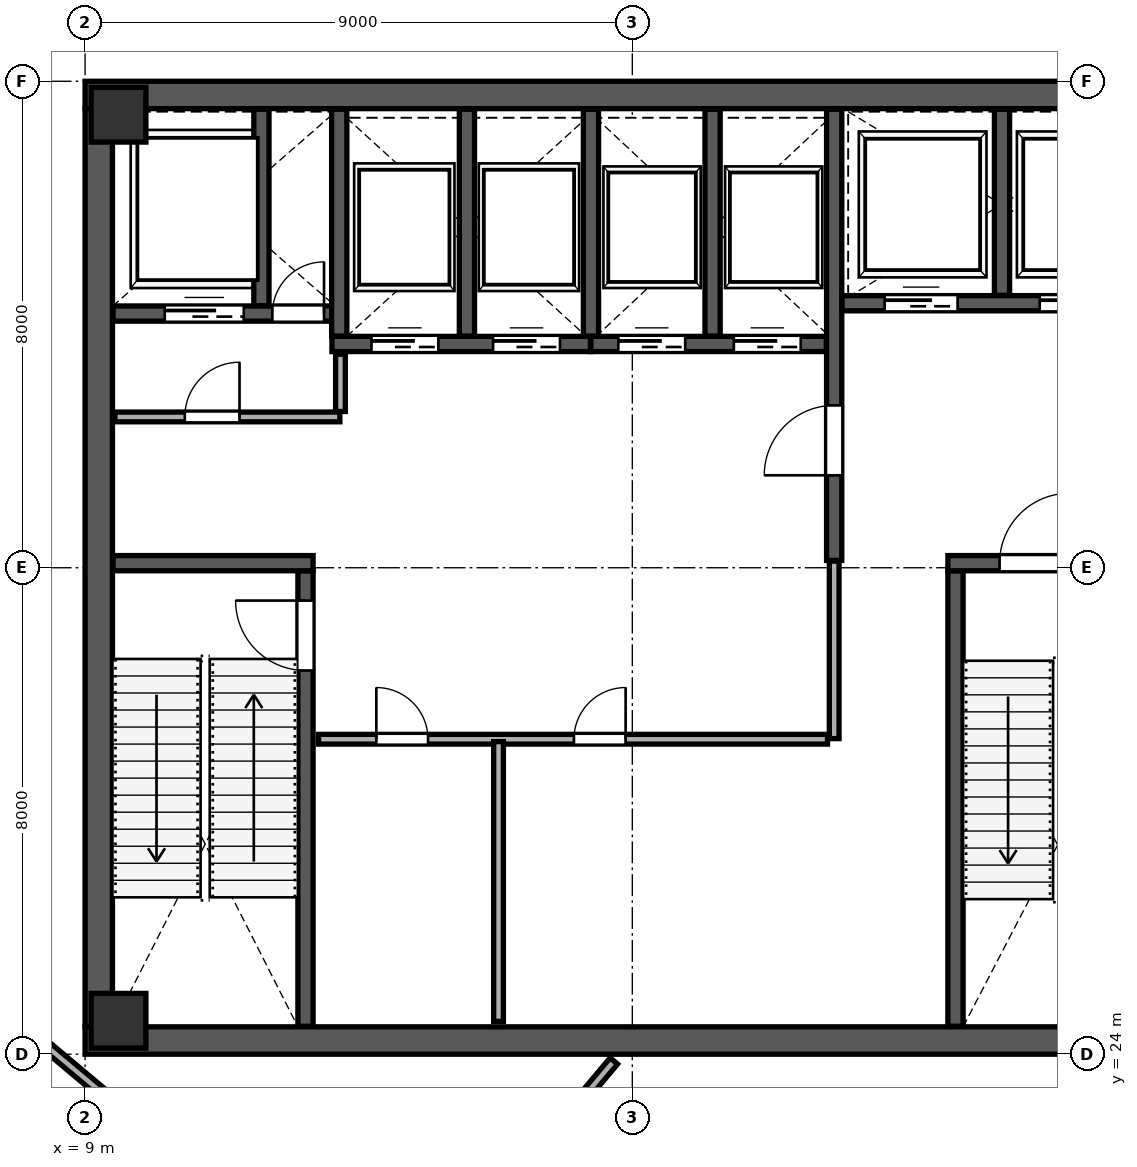
"""IFC4 building model, lengths in metres.
Left out: names, types, materials, properties, quantities, classifications, styles, units other than length and angle.
Written with IfcOpenShell. Run it as: python <this file> out.ifc"""

import sys

from ifc_helpers import new_model, si_unit, direction, frame, frame_2d, origin, origin_2d, place, context, subcontext, project, spatial, rectangle, extrude, source, transform, mapped, element, fill, save


model = new_model("IFC4")
c1 = context("Model", 3, precision=1e-05, world=origin(), true_north=direction((0.0, 1.0)))
c2 = subcontext(c1, "Body", "Model", "MODEL_VIEW")
j1 = project(units=[si_unit("LENGTHUNIT", "METRE"), si_unit("PLANEANGLEUNIT", "RADIAN")], contexts=[c1])
p1 = place(None, origin())
s1 = spatial("IfcSite", under=j1, at=p1, CompositionType="ELEMENT")
p2 = place(p1, origin())
s2 = spatial("IfcBuilding", under=s1, at=p2, CompositionType="ELEMENT")
p3 = place(p2, frame((0.0, 0.0, 215.2)))
s3 = spatial("IfcBuildingStorey", under=s2, at=p3, CompositionType="ELEMENT", Elevation=215.2)
m1 = source(origin(), c2, "Body", "SweptSolid", [
    extrude(rectangle(XDim=0.9, YDim=0.9, at=origin_2d()), origin(), (0.0, 0.0, 1.0), 5.399),
])
for number, where, z_axis, x_axis in (
    (1, (9.55, 24.55, 0.001), (0.0, 0.0, 1.0), (1.0, 0.0, 0.0)),
    (2, (9.55, 39.45, 0.001), (0.0, 0.0, 1.0), (1.0, 0.0, 0.0)),
):
    element("IfcColumn", number, at=place(p3, frame(where, z_axis=z_axis, x_axis=x_axis)), inside=s3, PredefinedType="COLUMN", context=c2, shape_type="MappedRepresentation", body=[
        mapped(m1, transform((0.0, 0.0, 0.0), scale=1.0)),
    ])
p4 = place(p3, frame((9.225, 24.45, 0.0), z_axis=(0.0, 0.0, 1.0), x_axis=(0.0, 1.0, 0.0)))
e3 = element("IfcWall", 3, at=p4, inside=s3, PredefinedType="SHEAR", context=c2, shape_type="SweptSolid", body=[
    extrude(rectangle(XDim=15.1, YDim=0.45, at=frame_2d((7.55, 0.0))), origin(), (0.0, 0.0, 1.0), 5.16),
])
for number, where, z_axis, x_axis in (
    (4, (9.0, 24.225, 0.0), (0.0, 0.0, 1.0), (1.0, 0.0, 0.0)),
    (5, (9.0, 39.775, 0.0), (0.0, 0.0, 1.0), (1.0, 0.0, 0.0)),
):
    element("IfcWall", number, at=place(p3, frame(where, z_axis=z_axis, x_axis=x_axis)), inside=s3, PredefinedType="SHEAR", context=c2, shape_type="SweptSolid", body=[
        extrude(rectangle(XDim=18.0, YDim=0.45, at=frame_2d((9.0, 0.0))), origin(), (0.0, 0.0, 1.0), 5.16),
    ])
p5 = place(p3, frame((12.625, 24.46, 0.0), z_axis=(0.0, 0.0, 1.0), x_axis=(0.0, 1.0, 0.0)))
e6 = element("IfcWall", 6, at=p5, inside=s3, PredefinedType="SHEAR", context=c2, shape_type="SweptSolid", body=[
    extrude(rectangle(XDim=7.49, YDim=0.25, at=frame_2d((3.745, 0.0))), origin(), (0.0, 0.0, 1.0), 5.16),
])
p6 = place(p5, frame((5.85, 0.0, 0.0)))
e7 = element("IfcOpeningElement", 7, at=p6, cuts=e6, PredefinedType="OPENING", context=c2, shape_type="SweptSolid", body=[
    extrude(rectangle(XDim=1.15, YDim=2.2, at=frame_2d((0.575, 1.1))), frame((0.0, 0.135, 0.0), z_axis=(0.0, -1.0, 0.0), x_axis=(1.0, 0.0, 0.0)), (0.0, 0.0, 1.0), 0.27),
])
p7 = place(p3, frame((9.46, 32.075, 0.0), z_axis=(0.0, 0.0, 1.0), x_axis=(1.0, 0.0, 0.0)))
e8 = element("IfcWall", 8, at=p7, inside=s3, PredefinedType="SHEAR", context=c2, shape_type="SweptSolid", body=[
    extrude(rectangle(XDim=3.29, YDim=0.25, at=frame_2d((1.645, 0.0))), origin(), (0.0, 0.0, 1.0), 5.16),
])
p8 = place(p3, frame((23.315, 24.46, 0.0), z_axis=(0.0, 0.0, 1.0), x_axis=(0.0, 1.0, 0.0)))
e9 = element("IfcWall", 9, at=p8, inside=s3, PredefinedType="SHEAR", context=c2, shape_type="SweptSolid", body=[
    extrude(rectangle(XDim=7.49, YDim=0.25, at=frame_2d((3.745, 0.0))), origin(), (0.0, 0.0, 1.0), 5.16),
])
p9 = place(p3, frame((23.19, 32.075, 0.0), z_axis=(0.0, 0.0, 1.0), x_axis=(1.0, 0.0, 0.0)))
e10 = element("IfcWall", 10, at=p9, inside=s3, PredefinedType="SHEAR", context=c2, shape_type="SweptSolid", body=[
    extrude(rectangle(XDim=3.35, YDim=0.25, at=frame_2d((1.675, 0.0))), origin(), (0.0, 0.0, 1.0), 5.16),
])
p10 = place(p9, frame((0.85, 0.0, 0.0)))
e11 = element("IfcOpeningElement", 11, at=p10, cuts=e10, PredefinedType="OPENING", context=c2, shape_type="SweptSolid", body=[
    extrude(rectangle(XDim=1.15, YDim=2.2, at=frame_2d((0.575, 1.1))), frame((0.0, 0.135, 0.0), z_axis=(0.0, -1.0, 0.0), x_axis=(1.0, 0.0, 0.0)), (0.0, 0.0, 1.0), 0.27),
])
p11 = place(p3, frame((21.32, 32.12, 0.0), z_axis=(0.0, 0.0, 1.0), x_axis=(0.0, 1.0, 0.0)))
e12 = element("IfcWall", 12, at=p11, inside=s3, PredefinedType="SHEAR", context=c2, shape_type="SweptSolid", body=[
    extrude(rectangle(XDim=7.42, YDim=0.25, at=frame_2d((3.71, 0.0))), origin(), (0.0, 0.0, 1.0), 5.16),
])
p12 = place(p11, frame((1.4, 0.0, 0.0)))
e13 = element("IfcOpeningElement", 13, at=p12, cuts=e12, PredefinedType="OPENING", context=c2, shape_type="SweptSolid", body=[
    extrude(rectangle(XDim=1.15, YDim=2.2, at=frame_2d((0.575, 1.1))), frame((0.0, 0.135, 0.0), z_axis=(0.0, -1.0, 0.0), x_axis=(1.0, 0.0, 0.0)), (0.0, 0.0, 1.0), 0.27),
])
p13 = place(p3, frame((9.46, 36.18, 0.0), z_axis=(0.0, 0.0, 1.0), x_axis=(1.0, 0.0, 0.0)))
e14 = element("IfcWall", 14, at=p13, inside=s3, PredefinedType="SHEAR", context=c2, shape_type="SweptSolid", body=[
    extrude(rectangle(XDim=3.79, YDim=0.25, at=frame_2d((1.895, 0.0))), origin(), (0.0, 0.0, 1.0), 5.16),
])
p14 = place(p13, frame((2.62, 0.0, 0.0)))
e15 = element("IfcOpeningElement", 15, at=p14, cuts=e14, PredefinedType="OPENING", context=c2, shape_type="SweptSolid", body=[
    extrude(rectangle(XDim=0.85, YDim=2.1, at=frame_2d((0.425, 1.05))), frame((0.0, 0.135, 0.0), z_axis=(0.0, -1.0, 0.0), x_axis=(1.0, 0.0, 0.0)), (0.0, 0.0, 1.0), 0.27),
])
p15 = place(p13, frame((0.85, 0.0, 0.0)))
e16 = element("IfcOpeningElement", 16, at=p15, cuts=e14, PredefinedType="OPENING", context=c2, shape_type="SweptSolid", body=[
    extrude(rectangle(XDim=1.3, YDim=2.25, at=frame_2d((0.65, 1.125))), frame((0.0, 0.135, 0.0), z_axis=(0.0, -1.0, 0.0), x_axis=(1.0, 0.0, 0.0)), (0.0, 0.0, 1.0), 0.27),
])
p16 = place(p3, frame((11.9, 36.31, 0.0), z_axis=(0.0, 0.0, 1.0), x_axis=(0.0, 1.0, 0.0)))
e17 = element("IfcWall", 17, at=p16, inside=s3, PredefinedType="SHEAR", context=c2, shape_type="SweptSolid", body=[
    extrude(rectangle(XDim=3.23, YDim=0.25, at=frame_2d((1.615, 0.0))), origin(), (0.0, 0.0, 1.0), 5.16),
])
p17 = place(p3, frame((21.45, 36.35, 0.0), z_axis=(0.0, 0.0, 1.0), x_axis=(1.0, 0.0, 0.0)))
e18 = element("IfcWall", 18, at=p17, inside=s3, PredefinedType="SHEAR", context=c2, shape_type="SweptSolid", body=[
    extrude(rectangle(XDim=5.09, YDim=0.25, at=frame_2d((2.545, 0.0))), origin(), (0.0, 0.0, 1.0), 5.16),
])
p18 = place(p17, frame((0.7, 0.0, 0.0)))
e19 = element("IfcOpeningElement", 19, at=p18, cuts=e18, PredefinedType="OPENING", context=c2, shape_type="SweptSolid", body=[
    extrude(rectangle(XDim=1.2, YDim=2.2, at=frame_2d((0.6, 1.1))), frame((0.0, 0.135, 0.0), z_axis=(0.0, -1.0, 0.0), x_axis=(1.0, 0.0, 0.0)), (0.0, 0.0, 1.0), 0.27),
])
p19 = place(p17, frame((3.25, 0.0, 0.0)))
e20 = element("IfcOpeningElement", 20, at=p19, cuts=e18, PredefinedType="OPENING", context=c2, shape_type="SweptSolid", body=[
    extrude(rectangle(XDim=1.2, YDim=2.2, at=frame_2d((0.6, 1.1))), frame((0.0, 0.135, 0.0), z_axis=(0.0, -1.0, 0.0), x_axis=(1.0, 0.0, 0.0)), (0.0, 0.0, 1.0), 0.27),
])
p20 = place(p3, frame((24.08, 36.48, 0.0), z_axis=(0.0, 0.0, 1.0), x_axis=(0.0, 1.0, 0.0)))
e21 = element("IfcWall", 21, at=p20, inside=s3, PredefinedType="SHEAR", context=c2, shape_type="SweptSolid", body=[
    extrude(rectangle(XDim=3.06, YDim=0.25, at=frame_2d((1.53, 0.0))), origin(), (0.0, 0.0, 1.0), 5.16),
])
p21 = place(p3, frame((13.06, 35.68, 0.0), z_axis=(0.0, 0.0, 1.0), x_axis=(1.0, 0.0, 0.0)))
e22 = element("IfcWall", 22, at=p21, inside=s3, PredefinedType="SHEAR", context=c2, shape_type="SweptSolid", body=[
    extrude(rectangle(XDim=4.25, YDim=0.25, at=frame_2d((2.125, 0.0))), origin(), (0.0, 0.0, 1.0), 5.16),
])
p22 = place(p21, frame((0.65, 0.0, 0.0)))
e23 = element("IfcOpeningElement", 23, at=p22, cuts=e22, PredefinedType="OPENING", context=c2, shape_type="SweptSolid", body=[
    extrude(rectangle(XDim=1.1, YDim=2.2, at=frame_2d((0.55, 1.1))), frame((0.0, 0.135, 0.0), z_axis=(0.0, -1.0, 0.0), x_axis=(1.0, 0.0, 0.0)), (0.0, 0.0, 1.0), 0.27),
])
p23 = place(p21, frame((2.65, 0.0, 0.0)))
e24 = element("IfcOpeningElement", 24, at=p23, cuts=e22, PredefinedType="OPENING", context=c2, shape_type="SweptSolid", body=[
    extrude(rectangle(XDim=1.1, YDim=2.2, at=frame_2d((0.55, 1.1))), frame((0.0, 0.135, 0.0), z_axis=(0.0, -1.0, 0.0), x_axis=(1.0, 0.0, 0.0)), (0.0, 0.0, 1.0), 0.27),
])
for number, where, z_axis, x_axis in (
    (25, (13.18, 35.81, 0.0), (0.0, 0.0, 1.0), (0.0, 1.0, 0.0)),
    (26, (15.28, 35.81, 0.0), (0.0, 0.0, 1.0), (0.0, 1.0, 0.0)),
):
    element("IfcWall", number, at=place(p3, frame(where, z_axis=z_axis, x_axis=x_axis)), inside=s3, PredefinedType="SHEAR", context=c2, shape_type="SweptSolid", body=[
        extrude(rectangle(XDim=3.73, YDim=0.25, at=frame_2d((1.865, 0.0))), origin(), (0.0, 0.0, 1.0), 5.16),
    ])
p24 = place(p3, frame((17.32, 35.68, 0.0), z_axis=(0.0, 0.0, 1.0), x_axis=(1.0, 0.0, 0.0)))
e27 = element("IfcWall", 27, at=p24, inside=s3, PredefinedType="SHEAR", context=c2, shape_type="SweptSolid", body=[
    extrude(rectangle(XDim=3.87, YDim=0.25, at=frame_2d((1.935, 0.0))), origin(), (0.0, 0.0, 1.0), 5.16),
])
p25 = place(p24, frame((0.45, 0.0, 0.0)))
e28 = element("IfcOpeningElement", 28, at=p25, cuts=e27, PredefinedType="OPENING", context=c2, shape_type="SweptSolid", body=[
    extrude(rectangle(XDim=1.1, YDim=2.2, at=frame_2d((0.55, 1.1))), frame((0.0, 0.135, 0.0), z_axis=(0.0, -1.0, 0.0), x_axis=(1.0, 0.0, 0.0)), (0.0, 0.0, 1.0), 0.27),
])
p26 = place(p24, frame((2.35, 0.0, 0.0)))
e29 = element("IfcOpeningElement", 29, at=p26, cuts=e27, PredefinedType="OPENING", context=c2, shape_type="SweptSolid", body=[
    extrude(rectangle(XDim=1.1, YDim=2.2, at=frame_2d((0.55, 1.1))), frame((0.0, 0.135, 0.0), z_axis=(0.0, -1.0, 0.0), x_axis=(1.0, 0.0, 0.0)), (0.0, 0.0, 1.0), 0.27),
])
for number, where, z_axis, x_axis in (
    (30, (17.32, 35.81, 0.0), (0.0, 0.0, 1.0), (0.0, 1.0, 0.0)),
    (31, (19.32, 35.81, 0.0), (0.0, 0.0, 1.0), (0.0, 1.0, 0.0)),
):
    element("IfcWall", number, at=place(p3, frame(where, z_axis=z_axis, x_axis=x_axis)), inside=s3, PredefinedType="SHEAR", context=c2, shape_type="SweptSolid", body=[
        extrude(rectangle(XDim=3.73, YDim=0.25, at=frame_2d((1.865, 0.0))), origin(), (0.0, 0.0, 1.0), 5.16),
    ])
p27 = place(p3, frame((9.49, 34.48, 0.0), z_axis=(0.0, 0.0, 1.0), x_axis=(1.0, 0.0, 0.0)))
e32 = element("IfcWall", 32, at=p27, inside=s3, PredefinedType="PARTITIONING", context=c2, shape_type="SweptSolid", body=[
    extrude(rectangle(XDim=3.7, YDim=0.16, at=frame_2d((1.85, 0.0))), origin(), (0.0, 0.0, 1.0), 5.16),
])
p28 = place(p27, frame((1.15, 0.0, 0.0)))
e33 = element("IfcOpeningElement", 33, at=p28, cuts=e32, PredefinedType="OPENING", context=c2, shape_type="SweptSolid", body=[
    extrude(rectangle(XDim=0.9, YDim=2.15, at=frame_2d((0.45, 1.075))), frame((0.0, 0.09, 0.0), z_axis=(0.0, -1.0, 0.0), x_axis=(1.0, 0.0, 0.0)), (0.0, 0.0, 1.0), 0.18),
])
p29 = place(p3, frame((13.2, 34.57, 0.0), z_axis=(0.0, 0.0, 1.0), x_axis=(0.0, 1.0, 0.0)))
e34 = element("IfcWall", 34, at=p29, inside=s3, PredefinedType="PARTITIONING", context=c2, shape_type="SweptSolid", body=[
    extrude(rectangle(XDim=0.94, YDim=0.16, at=frame_2d((0.47, 0.0))), origin(), (0.0, 0.0, 1.0), 5.16),
])
p30 = place(p3, frame((12.84, 29.18, 0.0), z_axis=(0.0, 0.0, 1.0), x_axis=(1.0, 0.0, 0.0)))
e35 = element("IfcWall", 35, at=p30, inside=s3, PredefinedType="PARTITIONING", context=c2, shape_type="SweptSolid", body=[
    extrude(rectangle(XDim=8.37, YDim=0.16, at=frame_2d((4.185, 0.0))), origin(), (0.0, 0.0, 1.0), 5.16),
])
p31 = place(p30, frame((0.95, 0.0, 0.0)))
e36 = element("IfcOpeningElement", 36, at=p31, cuts=e35, PredefinedType="OPENING", context=c2, shape_type="SweptSolid", body=[
    extrude(rectangle(XDim=0.85, YDim=2.1, at=frame_2d((0.425, 1.05))), frame((0.0, 0.09, 0.0), z_axis=(0.0, -1.0, 0.0), x_axis=(1.0, 0.0, 0.0)), (0.0, 0.0, 1.0), 0.18),
])
p32 = place(p30, frame((4.2, 0.0, 0.0)))
e37 = element("IfcOpeningElement", 37, at=p32, cuts=e35, PredefinedType="OPENING", context=c2, shape_type="SweptSolid", body=[
    extrude(rectangle(XDim=0.85, YDim=2.1, at=frame_2d((0.425, 1.05))), frame((0.0, 0.09, 0.0), z_axis=(0.0, -1.0, 0.0), x_axis=(1.0, 0.0, 0.0)), (0.0, 0.0, 1.0), 0.18),
])
p33 = place(p3, frame((15.8, 24.54, 0.0), z_axis=(0.0, 0.0, 1.0), x_axis=(0.0, 1.0, 0.0)))
e38 = element("IfcWall", 38, at=p33, inside=s3, PredefinedType="PARTITIONING", context=c2, shape_type="SweptSolid", body=[
    extrude(rectangle(XDim=4.6, YDim=0.16, at=frame_2d((2.3, 0.0))), origin(), (0.0, 0.0, 1.0), 5.16),
])
p34 = place(p3, frame((21.32, 29.19, 0.0), z_axis=(0.0, 0.0, 1.0), x_axis=(0.0, 1.0, 0.0)))
e39 = element("IfcWall", 39, at=p34, inside=s3, PredefinedType="PARTITIONING", context=c2, shape_type="SweptSolid", body=[
    extrude(rectangle(XDim=2.92, YDim=0.16, at=frame_2d((1.46, 0.0))), origin(), (0.0, 0.0, 1.0), 5.16),
])
p35 = place(p3, frame((5.067, 26.9, 0.0), z_axis=(0.0, 0.0, 1.0), x_axis=(0.766051435801, -0.64277927604, 0.0)))
e40 = element("IfcWall", 40, at=p35, inside=s3, PredefinedType="PARTITIONING", context=c2, shape_type="SweptSolid", body=[
    extrude(rectangle(XDim=11.57, YDim=0.16, at=frame_2d((5.785, 0.0))), origin(), (0.0, 0.0, 1.0), 5.16),
])
p36 = place(p35, frame((1.15, 0.0, 0.0)))
e41 = element("IfcOpeningElement", 41, at=p36, cuts=e40, PredefinedType="OPENING", context=c2, shape_type="SweptSolid", body=[
    extrude(rectangle(XDim=0.95, YDim=2.15, at=frame_2d((0.475, 1.075))), frame((0.0, 0.09, 0.0), z_axis=(0.0, -1.0, 0.0), x_axis=(1.0, 0.0, 0.0)), (0.0, 0.0, 1.0), 0.18),
])
p37 = place(p3, frame((13.987, 19.468, 0.0), z_axis=(0.0, 0.0, 1.0), x_axis=(0.642768435417, 0.766060531833, 0.0)))
e42 = element("IfcWall", 42, at=p37, inside=s3, PredefinedType="PARTITIONING", context=c2, shape_type="SweptSolid", body=[
    extrude(rectangle(XDim=5.772, YDim=0.16, at=frame_2d((2.886, 0.0))), origin(), (0.0, 0.0, 1.0), 5.16),
])
p38 = place(p3, frame((16.416, 50.848, 0.0), z_axis=(0.0, 0.0, 1.0), x_axis=(0.766042472976, -0.642789957604, 0.0)))
e43 = element("IfcWall", 43, at=p38, inside=s3, PredefinedType="PARTITIONING", context=c2, shape_type="SweptSolid", body=[
    extrude(rectangle(XDim=27.03, YDim=0.115, at=frame_2d((13.515, 0.0))), origin(), (0.0, 0.0, 1.0), 5.16),
])
p39 = place(p38, frame((18.8, 0.0, 0.0)))
e44 = element("IfcOpeningElement", 44, at=p39, cuts=e43, PredefinedType="OPENING", context=c2, shape_type="SweptSolid", body=[
    extrude(rectangle(XDim=0.95, YDim=2.15, at=frame_2d((0.475, 1.075))), frame((0.0, 0.067, 0.0), z_axis=(0.0, -1.0, 0.0), x_axis=(1.0, 0.0, 0.0)), (0.0, 0.0, 1.0), 0.135),
])
p40 = place(p3, frame((0.894, 32.412, 0.0), z_axis=(0.0, 0.0, 1.0), x_axis=(0.64277673271, 0.766053569854, 0.0)))
e45 = element("IfcWall", 45, at=p40, inside=s3, PredefinedType="PARTITIONING", context=c2, shape_type="SweptSolid", body=[
    extrude(rectangle(XDim=24.06, YDim=0.135, at=frame_2d((12.03, 0.0))), origin(), (0.0, 0.0, 1.0), 5.16),
])
p41 = place(p40, frame((2.2, 0.0, 0.0)))
e46 = element("IfcOpeningElement", 46, at=p41, cuts=e45, PredefinedType="OPENING", context=c2, shape_type="SweptSolid", body=[
    extrude(rectangle(XDim=0.95, YDim=2.15, at=frame_2d((0.475, 1.075))), frame((0.0, 0.078, 0.0), z_axis=(0.0, -1.0, 0.0), x_axis=(1.0, 0.0, 0.0)), (0.0, 0.0, 1.0), 0.155),
])
m2 = source(origin(), c2, "Body", "SweptSolid", [
    extrude(rectangle(XDim=1.15, YDim=2.2, at=frame_2d((0.575, 1.1))), frame((0.0, 0.025, 0.0), z_axis=(0.0, -1.0, 0.0), x_axis=(1.0, 0.0, 0.0)), (0.0, 0.0, 1.0), 0.05),
])
p42 = place(p6, origin())
e47 = element("IfcDoor", 47, at=p42, inside=s3, OperationType="SINGLE_SWING_RIGHT", PredefinedType="DOOR", context=c2, shape_type="MappedRepresentation", body=[
    mapped(m2, transform((0.0, 0.0, 0.0), scale=1.0)),
])
fill(e7, e47)
m3 = source(origin(), c2, "Body", "SweptSolid", [
    extrude(rectangle(XDim=1.15, YDim=2.2, at=frame_2d((0.575, 1.1))), frame((0.0, 0.025, 0.0), z_axis=(0.0, -1.0, 0.0), x_axis=(1.0, 0.0, 0.0)), (0.0, 0.0, 1.0), 0.05),
])
p43 = place(p12, origin())
e48 = element("IfcDoor", 48, at=p43, inside=s3, OperationType="SINGLE_SWING_LEFT", PredefinedType="DOOR", context=c2, shape_type="MappedRepresentation", body=[
    mapped(m3, transform((0.0, 0.0, 0.0), scale=1.0)),
])
fill(e13, e48)
p44 = place(p10, origin())
e49 = element("IfcDoor", 49, at=p44, inside=s3, OperationType="SINGLE_SWING_RIGHT", PredefinedType="DOOR", context=c2, shape_type="MappedRepresentation", body=[
    mapped(m2, transform((0.0, 0.0, 0.0), scale=1.0)),
])
fill(e11, e49)
m4 = source(origin(), c2, "Body", "SweptSolid", [
    extrude(rectangle(XDim=0.85, YDim=2.1, at=frame_2d((0.425, 1.05))), frame((0.0, 0.025, 0.0), z_axis=(0.0, -1.0, 0.0), x_axis=(1.0, 0.0, 0.0)), (0.0, 0.0, 1.0), 0.05),
])
p45 = place(p14, origin())
e50 = element("IfcDoor", 50, at=p45, inside=s3, OperationType="SINGLE_SWING_RIGHT", PredefinedType="DOOR", context=c2, shape_type="MappedRepresentation", body=[
    mapped(m4, transform((0.0, 0.0, 0.0), scale=1.0)),
])
fill(e15, e50)
m5 = source(origin(), c2, "Body", "SweptSolid", [
    extrude(rectangle(XDim=1.1, YDim=2.2, at=frame_2d((0.55, 1.1))), frame((0.0, 0.025, 0.0), z_axis=(0.0, -1.0, 0.0), x_axis=(1.0, 0.0, 0.0)), (0.0, 0.0, 1.0), 0.05),
])
p46 = place(p22, origin())
e51 = element("IfcDoor", 51, at=p46, inside=s3, OperationType="SLIDING_TO_LEFT", PredefinedType="DOOR", context=c2, shape_type="MappedRepresentation", body=[
    mapped(m5, transform((0.0, 0.0, 0.0), scale=1.0)),
])
fill(e23, e51)
p47 = place(p23, origin())
e52 = element("IfcDoor", 52, at=p47, inside=s3, OperationType="SLIDING_TO_RIGHT", PredefinedType="DOOR", context=c2, shape_type="MappedRepresentation", body=[
    mapped(m5, transform((0.0, 0.0, 0.0), scale=1.0)),
])
fill(e24, e52)
p48 = place(p25, origin())
e53 = element("IfcDoor", 53, at=p48, inside=s3, OperationType="SLIDING_TO_LEFT", PredefinedType="DOOR", context=c2, shape_type="MappedRepresentation", body=[
    mapped(m5, transform((0.0, 0.0, 0.0), scale=1.0)),
])
fill(e28, e53)
p49 = place(p26, origin())
e54 = element("IfcDoor", 54, at=p49, inside=s3, OperationType="SLIDING_TO_RIGHT", PredefinedType="DOOR", context=c2, shape_type="MappedRepresentation", body=[
    mapped(m5, transform((0.0, 0.0, 0.0), scale=1.0)),
])
fill(e29, e54)
m6 = source(origin(), c2, "Body", "SweptSolid", [
    extrude(rectangle(XDim=1.2, YDim=2.2, at=frame_2d((0.6, 1.1))), frame((0.0, 0.025, 0.0), z_axis=(0.0, -1.0, 0.0), x_axis=(1.0, 0.0, 0.0)), (0.0, 0.0, 1.0), 0.05),
])
p50 = place(p18, origin())
e55 = element("IfcDoor", 55, at=p50, inside=s3, OperationType="SLIDING_TO_LEFT", PredefinedType="DOOR", context=c2, shape_type="MappedRepresentation", body=[
    mapped(m6, transform((0.0, 0.0, 0.0), scale=1.0)),
])
fill(e19, e55)
p51 = place(p19, origin())
e56 = element("IfcDoor", 56, at=p51, inside=s3, OperationType="SLIDING_TO_RIGHT", PredefinedType="DOOR", context=c2, shape_type="MappedRepresentation", body=[
    mapped(m6, transform((0.0, 0.0, 0.0), scale=1.0)),
])
fill(e20, e56)
m7 = source(origin(), c2, "Body", "SweptSolid", [
    extrude(rectangle(XDim=1.3, YDim=2.25, at=frame_2d((0.65, 1.125))), frame((0.0, 0.025, 0.0), z_axis=(0.0, -1.0, 0.0), x_axis=(1.0, 0.0, 0.0)), (0.0, 0.0, 1.0), 0.05),
])
p52 = place(p15, origin())
e57 = element("IfcDoor", 57, at=p52, inside=s3, OperationType="SLIDING_TO_LEFT", PredefinedType="DOOR", context=c2, shape_type="MappedRepresentation", body=[
    mapped(m7, transform((0.0, 0.0, 0.0), scale=1.0)),
])
fill(e16, e57)
m8 = source(origin(), c2, "Body", "SweptSolid", [
    extrude(rectangle(XDim=0.9, YDim=2.15, at=frame_2d((0.45, 1.075))), frame((0.0, 0.025, 0.0), z_axis=(0.0, -1.0, 0.0), x_axis=(1.0, 0.0, 0.0)), (0.0, 0.0, 1.0), 0.05),
])
p53 = place(p28, origin())
e58 = element("IfcDoor", 58, at=p53, inside=s3, OperationType="SINGLE_SWING_RIGHT", PredefinedType="DOOR", context=c2, shape_type="MappedRepresentation", body=[
    mapped(m8, transform((0.0, 0.0, 0.0), scale=1.0)),
])
fill(e33, e58)
p54 = place(p31, origin())
e59 = element("IfcDoor", 59, at=p54, inside=s3, OperationType="SINGLE_SWING_LEFT", PredefinedType="DOOR", context=c2, shape_type="MappedRepresentation", body=[
    mapped(m4, transform((0.0, 0.0, 0.0), scale=1.0)),
])
fill(e36, e59)
p55 = place(p32, origin())
e60 = element("IfcDoor", 60, at=p55, inside=s3, OperationType="SINGLE_SWING_RIGHT", PredefinedType="DOOR", context=c2, shape_type="MappedRepresentation", body=[
    mapped(m4, transform((0.0, 0.0, 0.0), scale=1.0)),
])
fill(e37, e60)
save(model, sys.argv[1])
